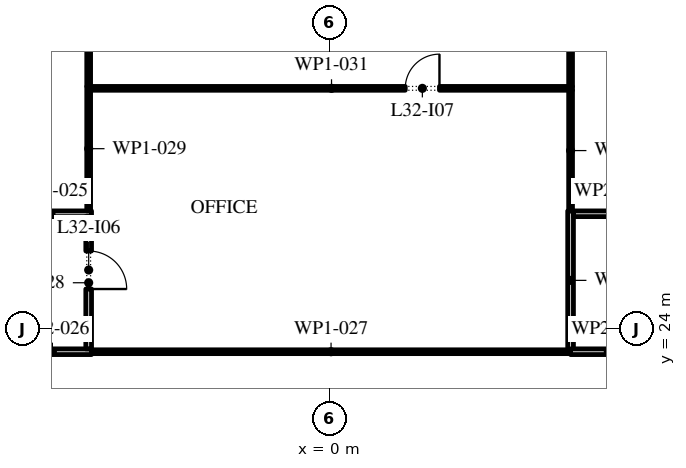
"""IFC4 building model, lengths in metres.
Left out: names, types, materials, properties, quantities, classifications, styles, units other than length and angle.
Written with IfcOpenShell. Run it as: python <this file> out.ifc"""

import sys

from ifc_helpers import new_model, si_unit, direction, frame, frame_2d, origin, place, context, subcontext, project, spatial, rectangle, extrude, element, fill, save


model = new_model("IFC4")
c1 = context("Model", 3, precision=1e-05, world=origin(), true_north=direction((0.0, 1.0)))
c2 = subcontext(c1, "Body", "Model", "MODEL_VIEW")
j1 = project(units=[si_unit("LENGTHUNIT", "METRE"), si_unit("PLANEANGLEUNIT", "RADIAN")], contexts=[c1])
p1 = place(None, origin())
s1 = spatial("IfcSite", under=j1, at=p1, CompositionType="ELEMENT")
p2 = place(p1, origin())
s2 = spatial("IfcBuilding", under=s1, at=p2, CompositionType="ELEMENT")
p3 = place(p2, frame((0.0, 0.0, 147.6)))
s3 = spatial("IfcBuildingStorey", under=s2, at=p3, CompositionType="ELEMENT", Elevation=147.6)
p4 = place(p3, frame((31.078, 28.421, 0.0), z_axis=(0.0, 0.0, 1.0), x_axis=(-0.974370456532, 0.224949357493, 0.0)))
e1 = element("IfcWall", 1, at=p4, inside=s3, PredefinedType="STANDARD", context=c2, shape_type="SweptSolid", body=[
    extrude(rectangle(XDim=51.0, YDim=0.3, at=frame_2d((25.5, 0.0))), origin(), (0.0, 0.0, 1.0), 4.0),
])
p5 = place(p4, frame((1.875, 0.0, 0.45)))
e2 = element("IfcOpeningElement", 2, at=p5, cuts=e1, PredefinedType="OPENING", context=c2, shape_type="SweptSolid", body=[
    extrude(rectangle(XDim=4.5, YDim=2.875, at=frame_2d((2.25, 1.438))), frame((0.0, 0.16, 0.0), z_axis=(0.0, -1.0, 0.0), x_axis=(1.0, 0.0, 0.0)), (0.0, 0.0, 1.0), 0.32),
])
p6 = place(p4, frame((10.275, 0.0, 0.45)))
e3 = element("IfcOpeningElement", 3, at=p6, cuts=e1, PredefinedType="OPENING", context=c2, shape_type="SweptSolid", body=[
    extrude(rectangle(XDim=4.5, YDim=2.75, at=frame_2d((2.25, 1.375))), frame((0.0, 0.16, 0.0), z_axis=(0.0, -1.0, 0.0), x_axis=(1.0, 0.0, 0.0)), (0.0, 0.0, 1.0), 0.32),
])
p7 = place(p4, frame((18.825, 0.0, 0.45)))
e4 = element("IfcOpeningElement", 4, at=p7, cuts=e1, PredefinedType="OPENING", context=c2, shape_type="SweptSolid", body=[
    extrude(rectangle(XDim=4.5, YDim=2.675, at=frame_2d((2.25, 1.337))), frame((0.0, 0.16, 0.0), z_axis=(0.0, -1.0, 0.0), x_axis=(1.0, 0.0, 0.0)), (0.0, 0.0, 1.0), 0.32),
])
p8 = place(p4, frame((28.425, 0.0, 0.0)))
e5 = element("IfcOpeningElement", 5, at=p8, cuts=e1, PredefinedType="OPENING", context=c2, shape_type="SweptSolid", body=[
    extrude(rectangle(XDim=2.4, YDim=3.025, at=frame_2d((1.2, 1.512))), frame((0.0, 0.16, 0.0), z_axis=(0.0, -1.0, 0.0), x_axis=(1.0, 0.0, 0.0)), (0.0, 0.0, 1.0), 0.32),
])
p9 = place(p4, frame((35.925, 0.0, 0.45)))
e6 = element("IfcOpeningElement", 6, at=p9, cuts=e1, PredefinedType="OPENING", context=c2, shape_type="SweptSolid", body=[
    extrude(rectangle(XDim=4.5, YDim=2.525, at=frame_2d((2.25, 1.262))), frame((0.0, 0.16, 0.0), z_axis=(0.0, -1.0, 0.0), x_axis=(1.0, 0.0, 0.0)), (0.0, 0.0, 1.0), 0.32),
])
p10 = place(p4, frame((44.475, 0.0, 0.45)))
e7 = element("IfcOpeningElement", 7, at=p10, cuts=e1, PredefinedType="OPENING", context=c2, shape_type="SweptSolid", body=[
    extrude(rectangle(XDim=4.5, YDim=2.45, at=frame_2d((2.25, 1.225))), frame((0.0, 0.16, 0.0), z_axis=(0.0, -1.0, 0.0), x_axis=(1.0, 0.0, 0.0)), (0.0, 0.0, 1.0), 0.32),
])
p11 = place(p3, frame((-8.4, 27.04, 0.0), z_axis=(0.0, 0.0, 1.0), x_axis=(1.0, 0.0, 0.0)))
e8 = element("IfcWall", 8, at=p11, inside=s3, PredefinedType="PARTITIONING", context=c2, shape_type="SweptSolid", body=[
    extrude(rectangle(XDim=2.135, YDim=0.15, at=frame_2d((1.067, 0.0))), origin(), (0.0, 0.0, 1.0), 4.0),
])
p12 = place(p3, frame((-6.265, 23.41, 0.0), z_axis=(0.0, 0.0, 1.0), x_axis=(-1.0, 0.0, 0.0)))
e9 = element("IfcWall", 9, at=p12, inside=s3, PredefinedType="PARTITIONING", context=c2, shape_type="SweptSolid", body=[
    extrude(rectangle(XDim=2.06, YDim=0.15, at=frame_2d((1.03, 0.0))), origin(), (0.0, 0.0, 1.0), 4.0),
])
p13 = place(p3, frame((-6.265, 23.41, 0.0), z_axis=(0.0, 0.0, 1.0), x_axis=(1.0, 0.0, 0.0)))
e10 = element("IfcWall", 10, at=p13, inside=s3, PredefinedType="PARTITIONING", context=c2, shape_type="SweptSolid", body=[
    extrude(rectangle(XDim=12.605, YDim=0.1, at=frame_2d((6.302, 0.0))), origin(), (0.0, 0.0, 1.0), 4.0),
])
p14 = place(p3, frame((-6.34, 26.965, 0.0), z_axis=(0.0, 0.0, 1.0), x_axis=(0.0, -1.0, 0.0)))
e11 = element("IfcWall", 11, at=p14, inside=s3, PredefinedType="PARTITIONING", context=c2, shape_type="SweptSolid", body=[
    extrude(rectangle(XDim=3.48, YDim=0.15, at=frame_2d((1.74, 0.0))), origin(), (0.0, 0.0, 1.0), 4.0),
])
p15 = place(p14, frame((0.905, 0.0, 0.0)))
e12 = element("IfcOpeningElement", 12, at=p15, cuts=e11, PredefinedType="OPENING", context=c2, shape_type="SweptSolid", body=[
    extrude(rectangle(XDim=1.0, YDim=2.1, at=frame_2d((0.5, 1.05))), frame((0.0, 0.085, 0.0), z_axis=(0.0, -1.0, 0.0), x_axis=(1.0, 0.0, 0.0)), (0.0, 0.0, 1.0), 0.17),
])
p16 = place(p3, frame((-6.34, 27.115, 0.0), z_axis=(0.0, 0.0, 1.0), x_axis=(0.0, 1.0, 0.0)))
e13 = element("IfcWall", 13, at=p16, inside=s3, PredefinedType="PARTITIONING", context=c2, shape_type="SweptSolid", body=[
    extrude(rectangle(XDim=3.275, YDim=0.1, at=frame_2d((1.637, 0.0))), origin(), (0.0, 0.0, 1.0), 4.0),
])
p17 = place(p3, frame((-6.34, 30.39, 0.0), z_axis=(0.0, 0.0, 1.0), x_axis=(0.0, 1.0, 0.0)))
e14 = element("IfcWall", 14, at=p17, inside=s3, PredefinedType="PARTITIONING", context=c2, shape_type="SweptSolid", body=[
    extrude(rectangle(XDim=3.06, YDim=0.1, at=frame_2d((1.53, 0.0))), origin(), (0.0, 0.0, 1.0), 4.0),
])
p18 = place(p3, frame((-6.29, 30.34, 0.0), z_axis=(0.0, 0.0, 1.0), x_axis=(1.0, 0.0, 0.0)))
e15 = element("IfcWall", 15, at=p18, inside=s3, PredefinedType="PARTITIONING", context=c2, shape_type="SweptSolid", body=[
    extrude(rectangle(XDim=12.68, YDim=0.1, at=frame_2d((6.34, 0.0))), origin(), (0.0, 0.0, 1.0), 4.0),
])
p19 = place(p18, frame((8.28, 0.0, 0.0)))
e16 = element("IfcOpeningElement", 16, at=p19, cuts=e15, PredefinedType="OPENING", context=c2, shape_type="SweptSolid", body=[
    extrude(rectangle(XDim=0.9, YDim=2.1, at=frame_2d((0.45, 1.05))), frame((0.0, 0.06, 0.0), z_axis=(0.0, -1.0, 0.0), x_axis=(1.0, 0.0, 0.0)), (0.0, 0.0, 1.0), 0.12),
])
p20 = place(p3, frame((6.34, 23.46, 0.0), z_axis=(0.0, 0.0, 1.0), x_axis=(0.0, 1.0, 0.0)))
e17 = element("IfcWall", 17, at=p20, inside=s3, PredefinedType="PARTITIONING", context=c2, shape_type="SweptSolid", body=[
    extrude(rectangle(XDim=3.655, YDim=0.15, at=frame_2d((1.828, 0.0))), origin(), (0.0, 0.0, 1.0), 4.0),
])
p21 = place(p3, frame((6.34, 27.115, 0.0), z_axis=(0.0, 0.0, 1.0), x_axis=(0.0, 1.0, 0.0)))
e18 = element("IfcWall", 18, at=p21, inside=s3, PredefinedType="PARTITIONING", context=c2, shape_type="SweptSolid", body=[
    extrude(rectangle(XDim=3.175, YDim=0.1, at=frame_2d((1.587, 0.0))), origin(), (0.0, 0.0, 1.0), 4.0),
])
p22 = place(p3, frame((6.415, 27.04, 0.0), z_axis=(0.0, 0.0, 1.0), x_axis=(1.0, 0.0, 0.0)))
e19 = element("IfcWall", 19, at=p22, inside=s3, PredefinedType="PARTITIONING", context=c2, shape_type="SweptSolid", body=[
    extrude(rectangle(XDim=1.985, YDim=0.15, at=frame_2d((0.992, 0.0))), origin(), (0.0, 0.0, 1.0), 4.0),
])
p23 = place(p3, frame((6.34, 30.39, 0.0), z_axis=(0.0, 0.0, 1.0), x_axis=(0.0, 1.0, 0.0)))
e20 = element("IfcWall", 20, at=p23, inside=s3, PredefinedType="PARTITIONING", context=c2, shape_type="SweptSolid", body=[
    extrude(rectangle(XDim=3.671, YDim=0.1, at=frame_2d((1.835, 0.0))), origin(), (0.0, 0.0, 1.0), 4.0),
])
p24 = place(p3, frame((8.325, 23.41, 0.0), z_axis=(0.0, 0.0, 1.0), x_axis=(-1.0, 0.0, 0.0)))
e21 = element("IfcWall", 21, at=p24, inside=s3, PredefinedType="PARTITIONING", context=c2, shape_type="SweptSolid", body=[
    extrude(rectangle(XDim=1.985, YDim=0.15, at=frame_2d((0.992, 0.0))), origin(), (0.0, 0.0, 1.0), 4.0),
])
p25 = place(p15, origin())
e22 = element("IfcDoor", 22, at=p25, inside=s3, OperationType="SINGLE_SWING_LEFT", PredefinedType="DOOR", context=c2, shape_type="SweptSolid", body=[
    extrude(rectangle(XDim=1.0, YDim=2.1, at=frame_2d((0.5, 1.05))), frame((0.0, 0.025, 0.0), z_axis=(0.0, -1.0, 0.0), x_axis=(1.0, 0.0, 0.0)), (0.0, 0.0, 1.0), 0.05),
])
fill(e12, e22)
p26 = place(p19, origin())
e23 = element("IfcDoor", 23, at=p26, inside=s3, OperationType="SINGLE_SWING_LEFT", PredefinedType="DOOR", context=c2, shape_type="SweptSolid", body=[
    extrude(rectangle(XDim=0.9, YDim=2.1, at=frame_2d((0.45, 1.05))), frame((0.0, 0.025, 0.0), z_axis=(0.0, -1.0, 0.0), x_axis=(1.0, 0.0, 0.0)), (0.0, 0.0, 1.0), 0.05),
])
fill(e16, e23)
save(model, sys.argv[1])
